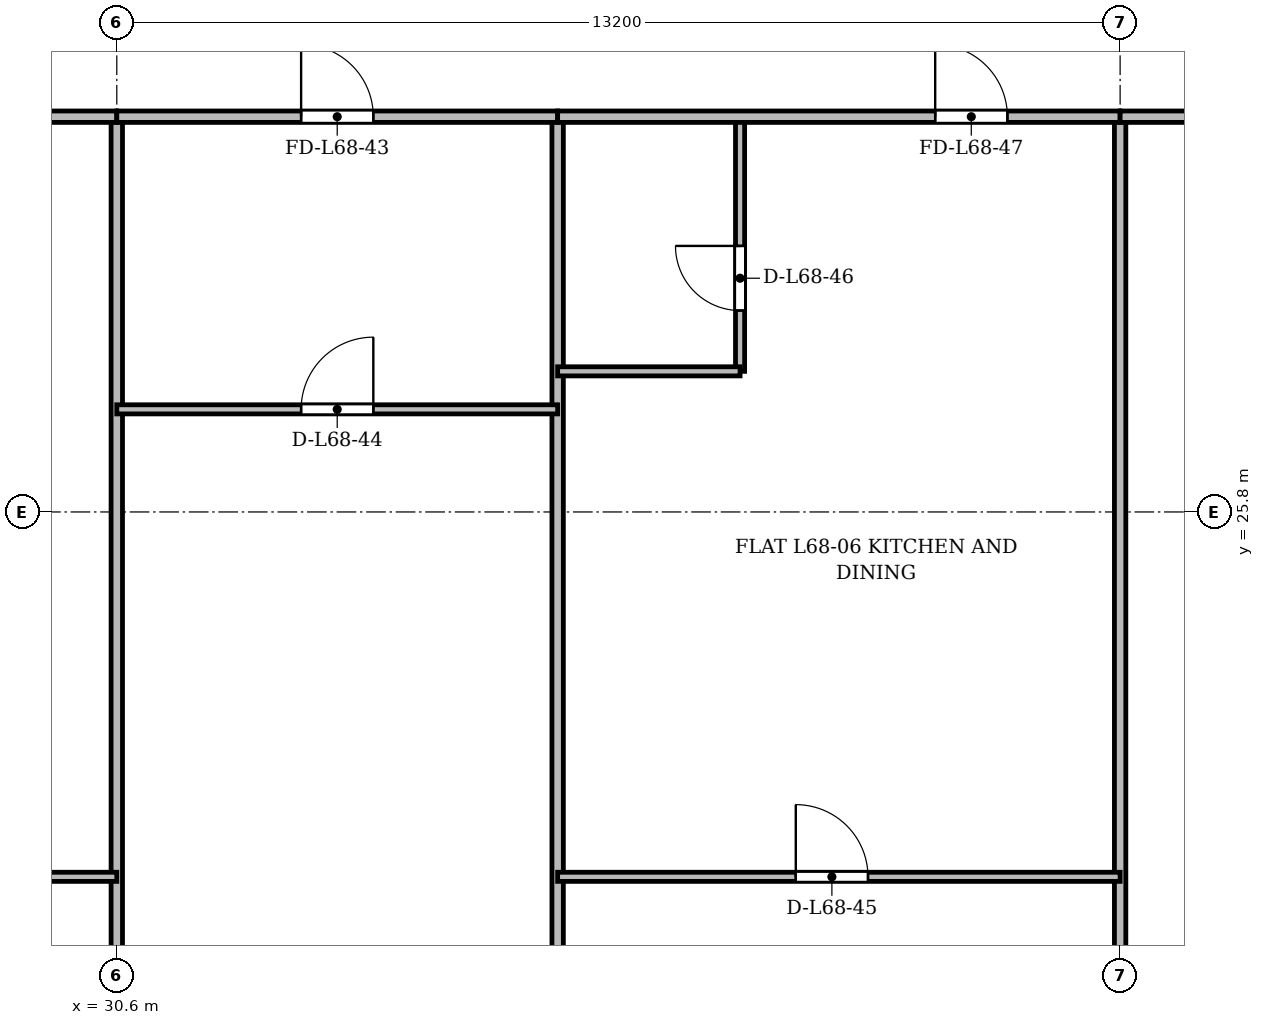
"""IFC4 building model, lengths in metres.
Left out: names, types, materials, properties, quantities, classifications, styles, units other than length and angle.
Written with IfcOpenShell. Run it as: python <this file> out.ifc"""

import sys

from ifc_helpers import new_model, si_unit, direction, frame, frame_2d, origin, place, context, subcontext, project, spatial, rectangle, extrude, source, transform, mapped, element, fill, save


model = new_model("IFC4")
c1 = context("Model", 3, precision=1e-05, world=origin(), true_north=direction((0.0, 1.0)))
c2 = subcontext(c1, "Body", "Model", "MODEL_VIEW")
j1 = project(units=[si_unit("LENGTHUNIT", "METRE"), si_unit("PLANEANGLEUNIT", "RADIAN")], contexts=[c1])
p1 = place(None, origin())
s1 = spatial("IfcSite", under=j1, at=p1, CompositionType="ELEMENT")
p2 = place(p1, origin())
s2 = spatial("IfcBuilding", under=s1, at=p2, CompositionType="ELEMENT")
p3 = place(p2, frame((0.0, 0.0, 263.1)))
s3 = spatial("IfcBuildingStorey", under=s2, at=p3, CompositionType="ELEMENT", Elevation=263.1)
p4 = place(p3, frame((30.6, 3.725, 0.0), z_axis=(0.0, 0.0, 1.0), x_axis=(0.0, 1.0, 0.0)))
e1 = element("IfcWall", 1, at=p4, inside=s3, PredefinedType="PARTITIONING", context=c2, shape_type="SweptSolid", body=[
    extrude(rectangle(XDim=27.275, YDim=0.15, at=frame_2d((13.637, 0.0))), origin(), (0.0, 0.0, 1.0), 2.87),
])
p5 = place(p3, frame((36.4, 3.725, 0.0), z_axis=(0.0, 0.0, 1.0), x_axis=(0.0, 1.0, 0.0)))
e2 = element("IfcWall", 2, at=p5, inside=s3, PredefinedType="PARTITIONING", context=c2, shape_type="SweptSolid", body=[
    extrude(rectangle(XDim=27.275, YDim=0.15, at=frame_2d((13.637, 0.0))), origin(), (0.0, 0.0, 1.0), 2.92),
])
p6 = place(p3, frame((43.8, 3.725, 0.0), z_axis=(0.0, 0.0, 1.0), x_axis=(0.0, 1.0, 0.0)))
e3 = element("IfcWall", 3, at=p6, inside=s3, PredefinedType="PARTITIONING", context=c2, shape_type="SweptSolid", body=[
    extrude(rectangle(XDim=27.275, YDim=0.15, at=frame_2d((13.637, 0.0))), origin(), (0.0, 0.0, 1.0), 2.87),
])
p7 = place(p3, frame((23.4, 21.0, 0.0), z_axis=(0.0, 0.0, 1.0), x_axis=(1.0, 0.0, 0.0)))
e4 = element("IfcWall", 4, at=p7, inside=s3, PredefinedType="PARTITIONING", context=c2, shape_type="SweptSolid", body=[
    extrude(rectangle(XDim=7.2, YDim=0.12, at=frame_2d((3.6, 0.0))), origin(), (0.0, 0.0, 1.0), 2.87),
])
p8 = place(p7, frame((3.125, 0.0, 0.0)))
e5 = element("IfcOpeningElement", 5, at=p8, cuts=e4, PredefinedType="OPENING", context=c2, shape_type="SweptSolid", body=[
    extrude(rectangle(XDim=0.95, YDim=2.15, at=frame_2d((0.475, 1.075))), frame((0.0, 0.07, 0.0), z_axis=(0.0, -1.0, 0.0), x_axis=(1.0, 0.0, 0.0)), (0.0, 0.0, 1.0), 0.14),
])
p9 = place(p3, frame((23.4, 31.0, 0.0), z_axis=(0.0, 0.0, 1.0), x_axis=(1.0, 0.0, 0.0)))
e6 = element("IfcWall", 6, at=p9, inside=s3, PredefinedType="PARTITIONING", context=c2, shape_type="SweptSolid", body=[
    extrude(rectangle(XDim=7.2, YDim=0.15, at=frame_2d((3.6, 0.0))), origin(), (0.0, 0.0, 1.0), 2.87),
])
p10 = place(p9, frame((4.706, 0.0, 0.0)))
e7 = element("IfcOpeningElement", 7, at=p10, cuts=e6, PredefinedType="OPENING", context=c2, shape_type="SweptSolid", body=[
    extrude(rectangle(XDim=0.95, YDim=2.15, at=frame_2d((0.475, 1.075))), frame((0.0, 0.085, 0.0), z_axis=(0.0, -1.0, 0.0), x_axis=(1.0, 0.0, 0.0)), (0.0, 0.0, 1.0), 0.17),
])
p11 = place(p3, frame((30.6, 31.0, 0.0), z_axis=(0.0, 0.0, 1.0), x_axis=(1.0, 0.0, 0.0)))
e8 = element("IfcWall", 8, at=p11, inside=s3, PredefinedType="PARTITIONING", context=c2, shape_type="SweptSolid", body=[
    extrude(rectangle(XDim=5.8, YDim=0.15, at=frame_2d((2.9, 0.0))), origin(), (0.0, 0.0, 1.0), 2.87),
])
p12 = place(p11, frame((2.425, 0.0, 0.0)))
e9 = element("IfcOpeningElement", 9, at=p12, cuts=e8, PredefinedType="OPENING", context=c2, shape_type="SweptSolid", body=[
    extrude(rectangle(XDim=0.95, YDim=2.15, at=frame_2d((0.475, 1.075))), frame((0.0, 0.085, 0.0), z_axis=(0.0, -1.0, 0.0), x_axis=(1.0, 0.0, 0.0)), (0.0, 0.0, 1.0), 0.17),
])
p13 = place(p3, frame((30.6, 27.15, 0.0), z_axis=(0.0, 0.0, 1.0), x_axis=(1.0, 0.0, 0.0)))
e10 = element("IfcWall", 10, at=p13, inside=s3, PredefinedType="PARTITIONING", context=c2, shape_type="SweptSolid", body=[
    extrude(rectangle(XDim=5.8, YDim=0.12, at=frame_2d((2.9, 0.0))), origin(), (0.0, 0.0, 1.0), 2.87),
])
p14 = place(p13, frame((2.425, 0.0, 0.0)))
e11 = element("IfcOpeningElement", 11, at=p14, cuts=e10, PredefinedType="OPENING", context=c2, shape_type="SweptSolid", body=[
    extrude(rectangle(XDim=0.95, YDim=2.15, at=frame_2d((0.475, 1.075))), frame((0.0, 0.07, 0.0), z_axis=(0.0, -1.0, 0.0), x_axis=(1.0, 0.0, 0.0)), (0.0, 0.0, 1.0), 0.14),
])
p15 = place(p3, frame((36.4, 21.0, 0.0), z_axis=(0.0, 0.0, 1.0), x_axis=(1.0, 0.0, 0.0)))
e12 = element("IfcWall", 12, at=p15, inside=s3, PredefinedType="PARTITIONING", context=c2, shape_type="SweptSolid", body=[
    extrude(rectangle(XDim=7.4, YDim=0.12, at=frame_2d((3.7, 0.0))), origin(), (0.0, 0.0, 1.0), 2.87),
])
p16 = place(p15, frame((3.133, 0.0, 0.0)))
e13 = element("IfcOpeningElement", 13, at=p16, cuts=e12, PredefinedType="OPENING", context=c2, shape_type="SweptSolid", body=[
    extrude(rectangle(XDim=0.95, YDim=2.15, at=frame_2d((0.475, 1.075))), frame((0.0, 0.07, 0.0), z_axis=(0.0, -1.0, 0.0), x_axis=(1.0, 0.0, 0.0)), (0.0, 0.0, 1.0), 0.14),
])
p17 = place(p3, frame((38.8, 27.65, 0.0), z_axis=(0.0, 0.0, 1.0), x_axis=(0.0, 1.0, 0.0)))
e14 = element("IfcWall", 14, at=p17, inside=s3, PredefinedType="PARTITIONING", context=c2, shape_type="SweptSolid", body=[
    extrude(rectangle(XDim=3.35, YDim=0.12, at=frame_2d((1.675, 0.0))), origin(), (0.0, 0.0, 1.0), 3.37),
])
p18 = place(p17, frame((0.8, 0.0, 0.0)))
e15 = element("IfcOpeningElement", 15, at=p18, cuts=e14, PredefinedType="OPENING", context=c2, shape_type="SweptSolid", body=[
    extrude(rectangle(XDim=0.85, YDim=2.1, at=frame_2d((0.425, 1.05))), frame((0.0, 0.07, 0.0), z_axis=(0.0, -1.0, 0.0), x_axis=(1.0, 0.0, 0.0)), (0.0, 0.0, 1.0), 0.14),
])
p19 = place(p3, frame((36.4, 27.65, 0.0), z_axis=(0.0, 0.0, 1.0), x_axis=(1.0, 0.0, 0.0)))
e16 = element("IfcWall", 16, at=p19, inside=s3, PredefinedType="PARTITIONING", context=c2, shape_type="SweptSolid", body=[
    extrude(rectangle(XDim=2.4, YDim=0.12, at=frame_2d((1.2, 0.0))), origin(), (0.0, 0.0, 1.0), 3.37),
])
p20 = place(p3, frame((36.4, 31.0, 0.0), z_axis=(0.0, 0.0, 1.0), x_axis=(1.0, 0.0, 0.0)))
e17 = element("IfcWall", 17, at=p20, inside=s3, PredefinedType="PARTITIONING", context=c2, shape_type="SweptSolid", body=[
    extrude(rectangle(XDim=7.4, YDim=0.15, at=frame_2d((3.7, 0.0))), origin(), (0.0, 0.0, 1.0), 2.87),
])
p21 = place(p20, frame((4.967, 0.0, 0.0)))
e18 = element("IfcOpeningElement", 18, at=p21, cuts=e17, PredefinedType="OPENING", context=c2, shape_type="SweptSolid", body=[
    extrude(rectangle(XDim=0.95, YDim=2.15, at=frame_2d((0.475, 1.075))), frame((0.0, 0.085, 0.0), z_axis=(0.0, -1.0, 0.0), x_axis=(1.0, 0.0, 0.0)), (0.0, 0.0, 1.0), 0.17),
])
p22 = place(p3, frame((43.8, 31.0, 0.0), z_axis=(0.0, 0.0, 1.0), x_axis=(1.0, 0.0, 0.0)))
e19 = element("IfcWall", 19, at=p22, inside=s3, PredefinedType="PARTITIONING", context=c2, shape_type="SweptSolid", body=[
    extrude(rectangle(XDim=7.2, YDim=0.15, at=frame_2d((3.6, 0.0))), origin(), (0.0, 0.0, 1.0), 2.87),
])
p23 = place(p22, frame((3.125, 0.0, 0.0)))
e20 = element("IfcOpeningElement", 20, at=p23, cuts=e19, PredefinedType="OPENING", context=c2, shape_type="SweptSolid", body=[
    extrude(rectangle(XDim=0.95, YDim=2.15, at=frame_2d((0.475, 1.075))), frame((0.0, 0.085, 0.0), z_axis=(0.0, -1.0, 0.0), x_axis=(1.0, 0.0, 0.0)), (0.0, 0.0, 1.0), 0.17),
])
m1 = source(origin(), c2, "Body", "SweptSolid", [
    extrude(rectangle(XDim=0.95, YDim=2.15, at=frame_2d((0.475, 1.075))), frame((0.0, 0.025, 0.0), z_axis=(0.0, -1.0, 0.0), x_axis=(1.0, 0.0, 0.0)), (0.0, 0.0, 1.0), 0.05),
])
p24 = place(p12, origin())
e21 = element("IfcDoor", 21, at=p24, inside=s3, OperationType="SINGLE_SWING_LEFT", PredefinedType="DOOR", context=c2, shape_type="MappedRepresentation", body=[
    mapped(m1, transform((0.0, 0.0, 0.0), x_axis=(1.0, 0.0, 0.0), y_axis=(0.0, 1.0, 0.0), z_axis=(0.0, 0.0, 1.0), scale=1.0)),
])
fill(e9, e21)
p25 = place(p14, origin())
e22 = element("IfcDoor", 22, at=p25, inside=s3, OperationType="SINGLE_SWING_RIGHT", PredefinedType="DOOR", context=c2, shape_type="MappedRepresentation", body=[
    mapped(m1, transform((0.0, 0.0, 0.0), x_axis=(1.0, 0.0, 0.0), y_axis=(0.0, 1.0, 0.0), z_axis=(0.0, 0.0, 1.0), scale=1.0)),
])
fill(e11, e22)
p26 = place(p16, origin())
e23 = element("IfcDoor", 23, at=p26, inside=s3, OperationType="SINGLE_SWING_LEFT", PredefinedType="DOOR", context=c2, shape_type="MappedRepresentation", body=[
    mapped(m1, transform((0.0, 0.0, 0.0), x_axis=(1.0, 0.0, 0.0), y_axis=(0.0, 1.0, 0.0), z_axis=(0.0, 0.0, 1.0), scale=1.0)),
])
fill(e13, e23)
m2 = source(origin(), c2, "Body", "SweptSolid", [
    extrude(rectangle(XDim=0.85, YDim=2.1, at=frame_2d((0.425, 1.05))), frame((0.0, 0.025, 0.0), z_axis=(0.0, -1.0, 0.0), x_axis=(1.0, 0.0, 0.0)), (0.0, 0.0, 1.0), 0.05),
])
p27 = place(p18, origin())
e24 = element("IfcDoor", 24, at=p27, inside=s3, OperationType="SINGLE_SWING_RIGHT", PredefinedType="DOOR", context=c2, shape_type="MappedRepresentation", body=[
    mapped(m2, transform((0.0, 0.0, 0.0), x_axis=(1.0, 0.0, 0.0), y_axis=(0.0, 1.0, 0.0), z_axis=(0.0, 0.0, 1.0), scale=1.0)),
])
fill(e15, e24)
p28 = place(p21, origin())
e25 = element("IfcDoor", 25, at=p28, inside=s3, OperationType="SINGLE_SWING_LEFT", PredefinedType="DOOR", context=c2, shape_type="MappedRepresentation", body=[
    mapped(m1, transform((0.0, 0.0, 0.0), x_axis=(1.0, 0.0, 0.0), y_axis=(0.0, 1.0, 0.0), z_axis=(0.0, 0.0, 1.0), scale=1.0)),
])
fill(e18, e25)
save(model, sys.argv[1])
